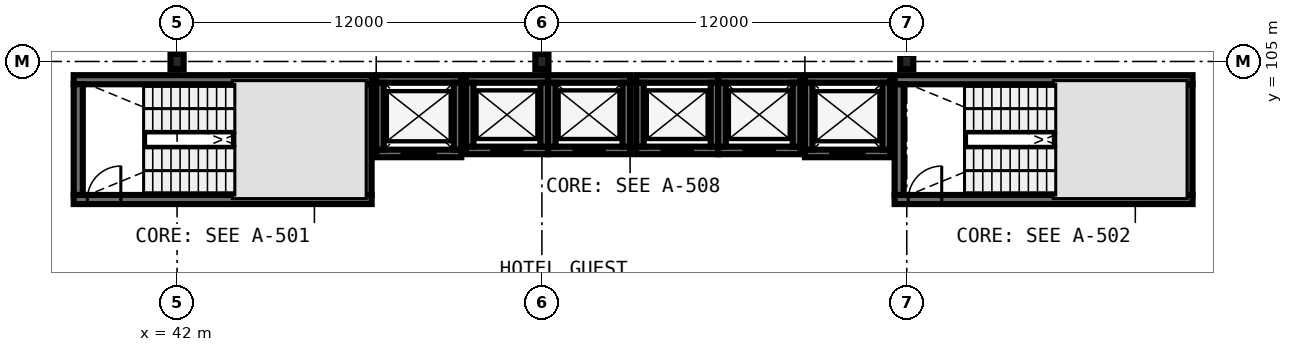
"""IFC4 building model, lengths in metres.
Left out: names, types, materials, properties, quantities, classifications, styles, units other than length and angle.
Written with IfcOpenShell. Run it as: python <this file> out.ifc"""

import sys

from ifc_helpers import new_model, si_unit, direction, frame, frame_2d, origin, origin_2d, place, context, subcontext, project, spatial, rectangle, i_section, extrude, element, fill, save


model = new_model("IFC4")
c1 = context("Model", 3, precision=1e-05, world=origin(), true_north=direction((0.0, 1.0)))
c2 = subcontext(c1, "Body", "Model", "MODEL_VIEW")
j1 = project(units=[si_unit("LENGTHUNIT", "METRE"), si_unit("PLANEANGLEUNIT", "RADIAN")], contexts=[c1])
p1 = place(None, origin())
s1 = spatial("IfcSite", under=j1, at=p1, CompositionType="ELEMENT")
p2 = place(p1, origin())
s2 = spatial("IfcBuilding", under=s1, at=p2, CompositionType="ELEMENT")
p3 = place(p2, frame((0.0, 0.0, 27.6)))
s3 = spatial("IfcBuildingStorey", under=s2, at=p3, CompositionType="ELEMENT", Elevation=27.6)
for number, where, z_axis, x_axis in (
    (1, (42.0, 105.0, 0.0), (0.0, 0.0, 1.0), (1.0, 0.0, 0.0)),
    (2, (54.0, 105.0, 0.0), (0.0, 0.0, 1.0), (1.0, 0.0, 0.0)),
    (3, (66.0, 105.0, 0.0), (0.0, 0.0, 1.0), (1.0, 0.0, 0.0)),
):
    element("IfcColumn", number, at=place(p3, frame(where, z_axis=z_axis, x_axis=x_axis)), inside=s3, PredefinedType="COLUMN", context=c2, shape_type="SweptSolid", body=[
        extrude(i_section(OverallWidth=0.432, OverallDepth=0.498, WebThickness=0.056, FlangeThickness=0.089, FilletRadius=0.031, at=origin_2d()), origin(), (0.0, 0.0, 1.0), 3.6),
    ])
p4 = place(p3, frame((38.6, 100.46, 0.0), z_axis=(0.0, 0.0, 1.0), x_axis=(1.0, 0.0, 0.0)))
e4 = element("IfcWall", 4, at=p4, inside=s3, PredefinedType="SHEAR", context=c2, shape_type="SweptSolid", body=[
    extrude(rectangle(XDim=9.8, YDim=0.3, at=frame_2d((4.9, 0.0))), origin(), (0.0, 0.0, 1.0), 3.6),
])
p5 = place(p4, frame((0.45, 0.0, 0.0)))
e5 = element("IfcOpeningElement", 5, at=p5, cuts=e4, PredefinedType="OPENING", context=c2, shape_type="SweptSolid", body=[
    extrude(rectangle(XDim=1.1, YDim=2.2, at=frame_2d((0.55, 1.1))), frame((0.0, 0.165, 0.0), z_axis=(0.0, -1.0, 0.0), x_axis=(1.0, 0.0, 0.0)), (0.0, 0.0, 1.0), 0.33),
])
p6 = place(p3, frame((48.4, 104.4, 0.0), z_axis=(0.0, 0.0, 1.0), x_axis=(-1.0, 0.0, 0.0)))
e6 = element("IfcWall", 6, at=p6, inside=s3, PredefinedType="SHEAR", context=c2, shape_type="SweptSolid", body=[
    extrude(rectangle(XDim=9.8, YDim=0.3, at=frame_2d((4.9, 0.0))), origin(), (0.0, 0.0, 1.0), 3.6),
])
for number, where, z_axis, x_axis in (
    (7, (38.75, 104.25, 0.0), (0.0, 0.0, 1.0), (0.0, -1.0, 0.0)),
    (8, (48.25, 100.61, 0.0), (0.0, 0.0, 1.0), (0.0, 1.0, 0.0)),
):
    element("IfcWall", number, at=place(p3, frame(where, z_axis=z_axis, x_axis=x_axis)), inside=s3, PredefinedType="SHEAR", context=c2, shape_type="SweptSolid", body=[
        extrude(rectangle(XDim=3.64, YDim=0.3, at=frame_2d((1.82, 0.0))), origin(), (0.0, 0.0, 1.0), 3.6),
    ])
p7 = place(p3, frame((65.6, 100.46, 0.0), z_axis=(0.0, 0.0, 1.0), x_axis=(1.0, 0.0, 0.0)))
e9 = element("IfcWall", 9, at=p7, inside=s3, PredefinedType="SHEAR", context=c2, shape_type="SweptSolid", body=[
    extrude(rectangle(XDim=9.8, YDim=0.3, at=frame_2d((4.9, 0.0))), origin(), (0.0, 0.0, 1.0), 3.6),
])
p8 = place(p7, frame((0.45, 0.0, 0.0)))
e10 = element("IfcOpeningElement", 10, at=p8, cuts=e9, PredefinedType="OPENING", context=c2, shape_type="SweptSolid", body=[
    extrude(rectangle(XDim=1.1, YDim=2.2, at=frame_2d((0.55, 1.1))), frame((0.0, 0.165, 0.0), z_axis=(0.0, -1.0, 0.0), x_axis=(1.0, 0.0, 0.0)), (0.0, 0.0, 1.0), 0.33),
])
p9 = place(p3, frame((75.4, 104.4, 0.0), z_axis=(0.0, 0.0, 1.0), x_axis=(-1.0, 0.0, 0.0)))
e11 = element("IfcWall", 11, at=p9, inside=s3, PredefinedType="SHEAR", context=c2, shape_type="SweptSolid", body=[
    extrude(rectangle(XDim=9.8, YDim=0.3, at=frame_2d((4.9, 0.0))), origin(), (0.0, 0.0, 1.0), 3.6),
])
for number, where, z_axis, x_axis in (
    (12, (65.75, 104.25, 0.0), (0.0, 0.0, 1.0), (0.0, -1.0, 0.0)),
    (13, (75.25, 100.61, 0.0), (0.0, 0.0, 1.0), (0.0, 1.0, 0.0)),
):
    element("IfcWall", number, at=place(p3, frame(where, z_axis=z_axis, x_axis=x_axis)), inside=s3, PredefinedType="SHEAR", context=c2, shape_type="SweptSolid", body=[
        extrude(rectangle(XDim=3.64, YDim=0.3, at=frame_2d((1.82, 0.0))), origin(), (0.0, 0.0, 1.0), 3.6),
    ])
p10 = place(p3, frame((48.55, 101.975, 0.0), z_axis=(0.0, 0.0, 1.0), x_axis=(1.0, 0.0, 0.0)))
e14 = element("IfcWall", 14, at=p10, inside=s3, PredefinedType="SHEAR", context=c2, shape_type="SweptSolid", body=[
    extrude(rectangle(XDim=2.8, YDim=0.25, at=frame_2d((1.4, 0.0))), origin(), (0.0, 0.0, 1.0), 3.6),
])
p11 = place(p10, frame((0.8, 0.0, 0.0)))
e15 = element("IfcOpeningElement", 15, at=p11, cuts=e14, PredefinedType="OPENING", context=c2, shape_type="SweptSolid", body=[
    extrude(rectangle(XDim=1.2, YDim=2.2, at=frame_2d((0.6, 1.1))), frame((0.0, 0.14, 0.0), z_axis=(0.0, -1.0, 0.0), x_axis=(1.0, 0.0, 0.0)), (0.0, 0.0, 1.0), 0.28),
])
p12 = place(p3, frame((51.35, 104.425, 0.0), z_axis=(0.0, 0.0, 1.0), x_axis=(-1.0, 0.0, 0.0)))
e16 = element("IfcWall", 16, at=p12, inside=s3, PredefinedType="SHEAR", context=c2, shape_type="SweptSolid", body=[
    extrude(rectangle(XDim=2.8, YDim=0.25, at=frame_2d((1.4, 0.0))), origin(), (0.0, 0.0, 1.0), 3.6),
])
for number, where, z_axis, x_axis in (
    (17, (48.675, 104.3, 0.0), (0.0, 0.0, 1.0), (0.0, -1.0, 0.0)),
    (18, (51.225, 102.1, 0.0), (0.0, 0.0, 1.0), (0.0, 1.0, 0.0)),
):
    element("IfcWall", number, at=place(p3, frame(where, z_axis=z_axis, x_axis=x_axis)), inside=s3, PredefinedType="SHEAR", context=c2, shape_type="SweptSolid", body=[
        extrude(rectangle(XDim=2.2, YDim=0.25, at=frame_2d((1.1, 0.0))), origin(), (0.0, 0.0, 1.0), 3.6),
    ])
p13 = place(p3, frame((62.65, 101.975, 0.0), z_axis=(0.0, 0.0, 1.0), x_axis=(1.0, 0.0, 0.0)))
e19 = element("IfcWall", 19, at=p13, inside=s3, PredefinedType="SHEAR", context=c2, shape_type="SweptSolid", body=[
    extrude(rectangle(XDim=2.8, YDim=0.25, at=frame_2d((1.4, 0.0))), origin(), (0.0, 0.0, 1.0), 3.6),
])
p14 = place(p13, frame((0.8, 0.0, 0.0)))
e20 = element("IfcOpeningElement", 20, at=p14, cuts=e19, PredefinedType="OPENING", context=c2, shape_type="SweptSolid", body=[
    extrude(rectangle(XDim=1.2, YDim=2.2, at=frame_2d((0.6, 1.1))), frame((0.0, 0.14, 0.0), z_axis=(0.0, -1.0, 0.0), x_axis=(1.0, 0.0, 0.0)), (0.0, 0.0, 1.0), 0.28),
])
p15 = place(p3, frame((65.45, 104.425, 0.0), z_axis=(0.0, 0.0, 1.0), x_axis=(-1.0, 0.0, 0.0)))
e21 = element("IfcWall", 21, at=p15, inside=s3, PredefinedType="SHEAR", context=c2, shape_type="SweptSolid", body=[
    extrude(rectangle(XDim=2.8, YDim=0.25, at=frame_2d((1.4, 0.0))), origin(), (0.0, 0.0, 1.0), 3.6),
])
for number, where, z_axis, x_axis in (
    (22, (62.775, 104.3, 0.0), (0.0, 0.0, 1.0), (0.0, -1.0, 0.0)),
    (23, (65.325, 102.1, 0.0), (0.0, 0.0, 1.0), (0.0, 1.0, 0.0)),
):
    element("IfcWall", number, at=place(p3, frame(where, z_axis=z_axis, x_axis=x_axis)), inside=s3, PredefinedType="SHEAR", context=c2, shape_type="SweptSolid", body=[
        extrude(rectangle(XDim=2.2, YDim=0.25, at=frame_2d((1.1, 0.0))), origin(), (0.0, 0.0, 1.0), 3.6),
    ])
p16 = place(p3, frame((51.5, 102.075, 0.0), z_axis=(0.0, 0.0, 1.0), x_axis=(1.0, 0.0, 0.0)))
e24 = element("IfcWall", 24, at=p16, inside=s3, PredefinedType="SHEAR", context=c2, shape_type="SweptSolid", body=[
    extrude(rectangle(XDim=2.7, YDim=0.25, at=frame_2d((1.35, 0.0))), origin(), (0.0, 0.0, 1.0), 3.6),
])
p17 = place(p16, frame((0.8, 0.0, 0.0)))
e25 = element("IfcOpeningElement", 25, at=p17, cuts=e24, PredefinedType="OPENING", context=c2, shape_type="SweptSolid", body=[
    extrude(rectangle(XDim=1.1, YDim=2.2, at=frame_2d((0.55, 1.1))), frame((0.0, 0.14, 0.0), z_axis=(0.0, -1.0, 0.0), x_axis=(1.0, 0.0, 0.0)), (0.0, 0.0, 1.0), 0.28),
])
p18 = place(p3, frame((54.2, 104.425, 0.0), z_axis=(0.0, 0.0, 1.0), x_axis=(-1.0, 0.0, 0.0)))
e26 = element("IfcWall", 26, at=p18, inside=s3, PredefinedType="SHEAR", context=c2, shape_type="SweptSolid", body=[
    extrude(rectangle(XDim=2.7, YDim=0.25, at=frame_2d((1.35, 0.0))), origin(), (0.0, 0.0, 1.0), 3.6),
])
for number, where, z_axis, x_axis in (
    (27, (51.625, 104.3, 0.0), (0.0, 0.0, 1.0), (0.0, -1.0, 0.0)),
    (28, (54.075, 102.2, 0.0), (0.0, 0.0, 1.0), (0.0, 1.0, 0.0)),
):
    element("IfcWall", number, at=place(p3, frame(where, z_axis=z_axis, x_axis=x_axis)), inside=s3, PredefinedType="SHEAR", context=c2, shape_type="SweptSolid", body=[
        extrude(rectangle(XDim=2.1, YDim=0.25, at=frame_2d((1.05, 0.0))), origin(), (0.0, 0.0, 1.0), 3.6),
    ])
p19 = place(p3, frame((54.2, 102.075, 0.0), z_axis=(0.0, 0.0, 1.0), x_axis=(1.0, 0.0, 0.0)))
e29 = element("IfcWall", 29, at=p19, inside=s3, PredefinedType="SHEAR", context=c2, shape_type="SweptSolid", body=[
    extrude(rectangle(XDim=2.7, YDim=0.25, at=frame_2d((1.35, 0.0))), origin(), (0.0, 0.0, 1.0), 3.6),
])
p20 = place(p19, frame((0.8, 0.0, 0.0)))
e30 = element("IfcOpeningElement", 30, at=p20, cuts=e29, PredefinedType="OPENING", context=c2, shape_type="SweptSolid", body=[
    extrude(rectangle(XDim=1.1, YDim=2.2, at=frame_2d((0.55, 1.1))), frame((0.0, 0.14, 0.0), z_axis=(0.0, -1.0, 0.0), x_axis=(1.0, 0.0, 0.0)), (0.0, 0.0, 1.0), 0.28),
])
p21 = place(p3, frame((56.9, 104.425, 0.0), z_axis=(0.0, 0.0, 1.0), x_axis=(-1.0, 0.0, 0.0)))
e31 = element("IfcWall", 31, at=p21, inside=s3, PredefinedType="SHEAR", context=c2, shape_type="SweptSolid", body=[
    extrude(rectangle(XDim=2.7, YDim=0.25, at=frame_2d((1.35, 0.0))), origin(), (0.0, 0.0, 1.0), 3.6),
])
for number, where, z_axis, x_axis in (
    (32, (54.325, 104.3, 0.0), (0.0, 0.0, 1.0), (0.0, -1.0, 0.0)),
    (33, (56.775, 102.2, 0.0), (0.0, 0.0, 1.0), (0.0, 1.0, 0.0)),
):
    element("IfcWall", number, at=place(p3, frame(where, z_axis=z_axis, x_axis=x_axis)), inside=s3, PredefinedType="SHEAR", context=c2, shape_type="SweptSolid", body=[
        extrude(rectangle(XDim=2.1, YDim=0.25, at=frame_2d((1.05, 0.0))), origin(), (0.0, 0.0, 1.0), 3.6),
    ])
p22 = place(p3, frame((57.1, 102.075, 0.0), z_axis=(0.0, 0.0, 1.0), x_axis=(1.0, 0.0, 0.0)))
e34 = element("IfcWall", 34, at=p22, inside=s3, PredefinedType="SHEAR", context=c2, shape_type="SweptSolid", body=[
    extrude(rectangle(XDim=2.7, YDim=0.25, at=frame_2d((1.35, 0.0))), origin(), (0.0, 0.0, 1.0), 3.6),
])
p23 = place(p22, frame((0.8, 0.0, 0.0)))
e35 = element("IfcOpeningElement", 35, at=p23, cuts=e34, PredefinedType="OPENING", context=c2, shape_type="SweptSolid", body=[
    extrude(rectangle(XDim=1.1, YDim=2.2, at=frame_2d((0.55, 1.1))), frame((0.0, 0.14, 0.0), z_axis=(0.0, -1.0, 0.0), x_axis=(1.0, 0.0, 0.0)), (0.0, 0.0, 1.0), 0.28),
])
p24 = place(p3, frame((59.8, 104.425, 0.0), z_axis=(0.0, 0.0, 1.0), x_axis=(-1.0, 0.0, 0.0)))
e36 = element("IfcWall", 36, at=p24, inside=s3, PredefinedType="SHEAR", context=c2, shape_type="SweptSolid", body=[
    extrude(rectangle(XDim=2.7, YDim=0.25, at=frame_2d((1.35, 0.0))), origin(), (0.0, 0.0, 1.0), 3.6),
])
for number, where, z_axis, x_axis in (
    (37, (57.225, 104.3, 0.0), (0.0, 0.0, 1.0), (0.0, -1.0, 0.0)),
    (38, (59.675, 102.2, 0.0), (0.0, 0.0, 1.0), (0.0, 1.0, 0.0)),
):
    element("IfcWall", number, at=place(p3, frame(where, z_axis=z_axis, x_axis=x_axis)), inside=s3, PredefinedType="SHEAR", context=c2, shape_type="SweptSolid", body=[
        extrude(rectangle(XDim=2.1, YDim=0.25, at=frame_2d((1.05, 0.0))), origin(), (0.0, 0.0, 1.0), 3.6),
    ])
p25 = place(p3, frame((59.8, 102.075, 0.0), z_axis=(0.0, 0.0, 1.0), x_axis=(1.0, 0.0, 0.0)))
e39 = element("IfcWall", 39, at=p25, inside=s3, PredefinedType="SHEAR", context=c2, shape_type="SweptSolid", body=[
    extrude(rectangle(XDim=2.7, YDim=0.25, at=frame_2d((1.35, 0.0))), origin(), (0.0, 0.0, 1.0), 3.6),
])
p26 = place(p25, frame((0.8, 0.0, 0.0)))
e40 = element("IfcOpeningElement", 40, at=p26, cuts=e39, PredefinedType="OPENING", context=c2, shape_type="SweptSolid", body=[
    extrude(rectangle(XDim=1.1, YDim=2.2, at=frame_2d((0.55, 1.1))), frame((0.0, 0.14, 0.0), z_axis=(0.0, -1.0, 0.0), x_axis=(1.0, 0.0, 0.0)), (0.0, 0.0, 1.0), 0.28),
])
p27 = place(p3, frame((62.5, 104.425, 0.0), z_axis=(0.0, 0.0, 1.0), x_axis=(-1.0, 0.0, 0.0)))
e41 = element("IfcWall", 41, at=p27, inside=s3, PredefinedType="SHEAR", context=c2, shape_type="SweptSolid", body=[
    extrude(rectangle(XDim=2.7, YDim=0.25, at=frame_2d((1.35, 0.0))), origin(), (0.0, 0.0, 1.0), 3.6),
])
for number, where, z_axis, x_axis in (
    (42, (59.925, 104.3, 0.0), (0.0, 0.0, 1.0), (0.0, -1.0, 0.0)),
    (43, (62.375, 102.2, 0.0), (0.0, 0.0, 1.0), (0.0, 1.0, 0.0)),
):
    element("IfcWall", number, at=place(p3, frame(where, z_axis=z_axis, x_axis=x_axis)), inside=s3, PredefinedType="SHEAR", context=c2, shape_type="SweptSolid", body=[
        extrude(rectangle(XDim=2.1, YDim=0.25, at=frame_2d((1.05, 0.0))), origin(), (0.0, 0.0, 1.0), 3.6),
    ])
p28 = place(p5, origin())
e44 = element("IfcDoor", 44, at=p28, inside=s3, OperationType="SINGLE_SWING_RIGHT", PredefinedType="DOOR", context=c2, shape_type="SweptSolid", body=[
    extrude(rectangle(XDim=1.1, YDim=2.2, at=frame_2d((0.55, 1.1))), frame((0.0, 0.025, 0.0), z_axis=(0.0, -1.0, 0.0), x_axis=(1.0, 0.0, 0.0)), (0.0, 0.0, 1.0), 0.05),
])
fill(e5, e44)
p29 = place(p8, origin())
e45 = element("IfcDoor", 45, at=p29, inside=s3, OperationType="SINGLE_SWING_RIGHT", PredefinedType="DOOR", context=c2, shape_type="SweptSolid", body=[
    extrude(rectangle(XDim=1.1, YDim=2.2, at=frame_2d((0.55, 1.1))), frame((0.0, 0.025, 0.0), z_axis=(0.0, -1.0, 0.0), x_axis=(1.0, 0.0, 0.0)), (0.0, 0.0, 1.0), 0.05),
])
fill(e10, e45)
p30 = place(p11, origin())
e46 = element("IfcDoor", 46, at=p30, inside=s3, OperationType="DOUBLE_DOOR_SLIDING", PredefinedType="DOOR", context=c2, shape_type="SweptSolid", body=[
    extrude(rectangle(XDim=1.2, YDim=2.2, at=frame_2d((0.6, 1.1))), frame((0.0, 0.025, 0.0), z_axis=(0.0, -1.0, 0.0), x_axis=(1.0, 0.0, 0.0)), (0.0, 0.0, 1.0), 0.05),
])
fill(e15, e46)
p31 = place(p14, origin())
e47 = element("IfcDoor", 47, at=p31, inside=s3, OperationType="DOUBLE_DOOR_SLIDING", PredefinedType="DOOR", context=c2, shape_type="SweptSolid", body=[
    extrude(rectangle(XDim=1.2, YDim=2.2, at=frame_2d((0.6, 1.1))), frame((0.0, 0.025, 0.0), z_axis=(0.0, -1.0, 0.0), x_axis=(1.0, 0.0, 0.0)), (0.0, 0.0, 1.0), 0.05),
])
fill(e20, e47)
p32 = place(p17, origin())
e48 = element("IfcDoor", 48, at=p32, inside=s3, OperationType="DOUBLE_DOOR_SLIDING", PredefinedType="DOOR", context=c2, shape_type="SweptSolid", body=[
    extrude(rectangle(XDim=1.1, YDim=2.2, at=frame_2d((0.55, 1.1))), frame((0.0, 0.025, 0.0), z_axis=(0.0, -1.0, 0.0), x_axis=(1.0, 0.0, 0.0)), (0.0, 0.0, 1.0), 0.05),
])
fill(e25, e48)
p33 = place(p20, origin())
e49 = element("IfcDoor", 49, at=p33, inside=s3, OperationType="DOUBLE_DOOR_SLIDING", PredefinedType="DOOR", context=c2, shape_type="SweptSolid", body=[
    extrude(rectangle(XDim=1.1, YDim=2.2, at=frame_2d((0.55, 1.1))), frame((0.0, 0.025, 0.0), z_axis=(0.0, -1.0, 0.0), x_axis=(1.0, 0.0, 0.0)), (0.0, 0.0, 1.0), 0.05),
])
fill(e30, e49)
p34 = place(p23, origin())
e50 = element("IfcDoor", 50, at=p34, inside=s3, OperationType="DOUBLE_DOOR_SLIDING", PredefinedType="DOOR", context=c2, shape_type="SweptSolid", body=[
    extrude(rectangle(XDim=1.1, YDim=2.2, at=frame_2d((0.55, 1.1))), frame((0.0, 0.025, 0.0), z_axis=(0.0, -1.0, 0.0), x_axis=(1.0, 0.0, 0.0)), (0.0, 0.0, 1.0), 0.05),
])
fill(e35, e50)
p35 = place(p26, origin())
e51 = element("IfcDoor", 51, at=p35, inside=s3, OperationType="DOUBLE_DOOR_SLIDING", PredefinedType="DOOR", context=c2, shape_type="SweptSolid", body=[
    extrude(rectangle(XDim=1.1, YDim=2.2, at=frame_2d((0.55, 1.1))), frame((0.0, 0.025, 0.0), z_axis=(0.0, -1.0, 0.0), x_axis=(1.0, 0.0, 0.0)), (0.0, 0.0, 1.0), 0.05),
])
fill(e40, e51)
save(model, sys.argv[1])
